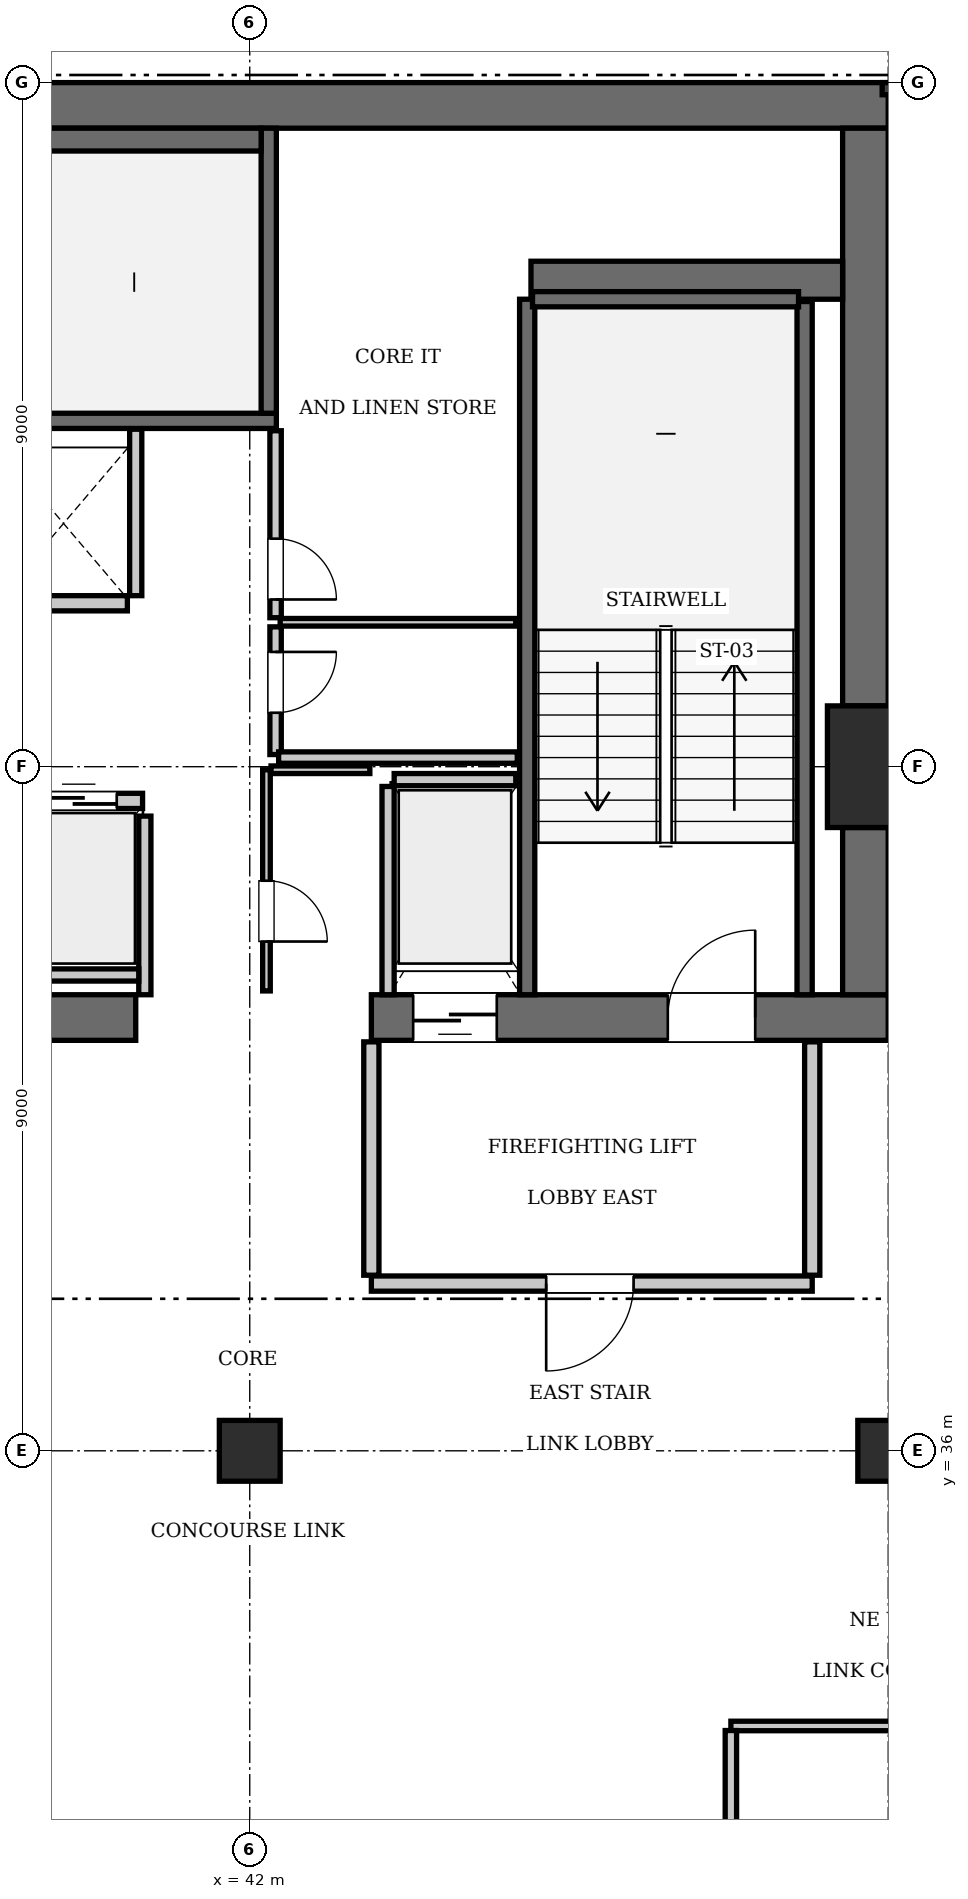
"""IFC4 building model, lengths in metres.
Left out: names, types, materials, properties, quantities, classifications, styles, units other than length and angle.
Written with IfcOpenShell. Run it as: python <this file> out.ifc"""

import sys

from ifc_helpers import new_model, si_unit, direction, frame, frame_2d, origin, origin_2d, place, context, subcontext, project, spatial, rectangle, extrude, element, fill, save


model = new_model("IFC4")
c1 = context("Model", 3, precision=1e-05, world=origin(), true_north=direction((0.0, 1.0)))
c2 = subcontext(c1, "Body", "Model", "MODEL_VIEW")
j1 = project(units=[si_unit("LENGTHUNIT", "METRE"), si_unit("PLANEANGLEUNIT", "RADIAN")], contexts=[c1])
p1 = place(None, origin())
s1 = spatial("IfcSite", under=j1, at=p1, CompositionType="ELEMENT")
p2 = place(p1, origin())
s2 = spatial("IfcBuilding", under=s1, at=p2, CompositionType="ELEMENT")
p3 = place(p2, frame((0.0, 0.0, 262.5)))
s3 = spatial("IfcBuildingStorey", under=s2, at=p3, CompositionType="ELEMENT", Elevation=262.5)
p4 = place(p3, frame((50.4, 45.0, 0.0), z_axis=(0.0, 0.0, 1.0), x_axis=(1.0, 0.0, 0.0)))
e1 = element("IfcColumn", 1, at=p4, inside=s3, PredefinedType="COLUMN", context=c2, shape_type="SweptSolid", body=[
    extrude(rectangle(XDim=1.6, YDim=1.6, at=origin_2d()), origin(), (0.0, 0.0, 1.0), 3.85),
])
p5 = place(p3, frame((25.2, 53.7, 0.0), z_axis=(0.0, 0.0, 1.0), x_axis=(1.0, 0.0, 0.0)))
e2 = element("IfcWall", 2, at=p5, inside=s3, PredefinedType="SHEAR", context=c2, shape_type="SweptSolid", body=[
    extrude(rectangle(XDim=25.2, YDim=0.6, at=frame_2d((12.6, 0.0))), origin(), (0.0, 0.0, 1.0), 3.85),
])
p6 = place(p3, frame((35.1, 41.7, 0.0), z_axis=(0.0, 0.0, 1.0), x_axis=(1.0, 0.0, 0.0)))
e3 = element("IfcWall", 3, at=p6, inside=s3, PredefinedType="SHEAR", context=c2, shape_type="SweptSolid", body=[
    extrude(rectangle(XDim=5.4, YDim=0.6, at=frame_2d((2.7, 0.0))), origin(), (0.0, 0.0, 1.0), 3.85),
])
p7 = place(p3, frame((43.6, 41.7, 0.0), z_axis=(0.0, 0.0, 1.0), x_axis=(1.0, 0.0, 0.0)))
e4 = element("IfcWall", 4, at=p7, inside=s3, PredefinedType="SHEAR", context=c2, shape_type="SweptSolid", body=[
    extrude(rectangle(XDim=6.8, YDim=0.6, at=frame_2d((3.4, 0.0))), origin(), (0.0, 0.0, 1.0), 3.85),
])
p8 = place(p7, frame((3.9, 0.0, 0.0)))
e5 = element("IfcOpeningElement", 5, at=p8, cuts=e4, PredefinedType="OPENING", context=c2, shape_type="SweptSolid", body=[
    extrude(rectangle(XDim=1.15, YDim=2.15, at=frame_2d((0.575, 1.075))), frame((0.0, 0.31, 0.0), z_axis=(0.0, -1.0, 0.0), x_axis=(1.0, 0.0, 0.0)), (0.0, 0.0, 1.0), 0.62),
])
p9 = place(p7, frame((0.55, 0.0, 0.0)))
e6 = element("IfcOpeningElement", 6, at=p9, cuts=e4, PredefinedType="OPENING", context=c2, shape_type="SweptSolid", body=[
    extrude(rectangle(XDim=1.1, YDim=2.2, at=frame_2d((0.55, 1.1))), frame((0.0, 0.31, 0.0), z_axis=(0.0, -1.0, 0.0), x_axis=(1.0, 0.0, 0.0)), (0.0, 0.0, 1.0), 0.62),
])
p10 = place(p3, frame((50.1, 42.0, 0.0), z_axis=(0.0, 0.0, 1.0), x_axis=(0.0, 1.0, 0.0)))
e7 = element("IfcWall", 7, at=p10, inside=s3, PredefinedType="SHEAR", context=c2, shape_type="SweptSolid", body=[
    extrude(rectangle(XDim=2.2, YDim=0.6, at=frame_2d((1.1, 0.0))), origin(), (0.0, 0.0, 1.0), 3.85),
])
p11 = place(p3, frame((50.1, 45.8, 0.0), z_axis=(0.0, 0.0, 1.0), x_axis=(0.0, 1.0, 0.0)))
e8 = element("IfcWall", 8, at=p11, inside=s3, PredefinedType="SHEAR", context=c2, shape_type="SweptSolid", body=[
    extrude(rectangle(XDim=7.6, YDim=0.6, at=frame_2d((3.8, 0.0))), origin(), (0.0, 0.0, 1.0), 3.85),
])
p12 = place(p3, frame((45.7, 51.4, 0.0), z_axis=(0.0, 0.0, 1.0), x_axis=(1.0, 0.0, 0.0)))
e9 = element("IfcWall", 9, at=p12, inside=s3, PredefinedType="SHEAR", context=c2, shape_type="SweptSolid", body=[
    extrude(rectangle(XDim=4.1, YDim=0.5, at=frame_2d((2.05, 0.0))), origin(), (0.0, 0.0, 1.0), 3.85),
])
for number, where, z_axis, x_axis in (
    (10, (42.0, 36.0, 0.0), (0.0, 0.0, 1.0), (1.0, 0.0, 0.0)),
    (11, (50.4, 36.0, 0.0), (0.0, 0.0, 1.0), (1.0, 0.0, 0.0)),
):
    element("IfcColumn", number, at=place(p3, frame(where, z_axis=z_axis, x_axis=x_axis)), inside=s3, PredefinedType="COLUMN", context=c2, shape_type="SweptSolid", body=[
        extrude(rectangle(XDim=0.8, YDim=0.8, at=origin_2d()), origin(), (0.0, 0.0, 1.0), 3.85),
    ])
p13 = place(p3, frame((33.25, 49.55, 0.0), z_axis=(0.0, 0.0, 1.0), x_axis=(1.0, 0.0, 0.0)))
e12 = element("IfcWall", 12, at=p13, inside=s3, PredefinedType="SOLIDWALL", context=c2, shape_type="SweptSolid", body=[
    extrude(rectangle(XDim=9.1, YDim=0.2, at=frame_2d((4.55, 0.0))), origin(), (0.0, 0.0, 1.0), 3.61),
])
p14 = place(p3, frame((42.25, 49.65, 0.0), z_axis=(0.0, 0.0, 1.0), x_axis=(0.0, 1.0, 0.0)))
e13 = element("IfcWall", 13, at=p14, inside=s3, PredefinedType="SOLIDWALL", context=c2, shape_type="SweptSolid", body=[
    extrude(rectangle(XDim=3.75, YDim=0.2, at=frame_2d((1.875, 0.0))), origin(), (0.0, 0.0, 1.0), 3.61),
])
p15 = place(p3, frame((33.45, 53.25, 0.0), z_axis=(0.0, 0.0, 1.0), x_axis=(1.0, 0.0, 0.0)))
e14 = element("IfcWall", 14, at=p15, inside=s3, PredefinedType="SOLIDWALL", context=c2, shape_type="SweptSolid", body=[
    extrude(rectangle(XDim=8.7, YDim=0.3, at=frame_2d((4.35, 0.0))), origin(), (0.0, 0.0, 1.0), 3.61),
])
p16 = place(p3, frame((45.65, 42.0, 0.0), z_axis=(0.0, 0.0, 1.0), x_axis=(0.0, 1.0, 0.0)))
e15 = element("IfcWall", 15, at=p16, inside=s3, PredefinedType="SOLIDWALL", context=c2, shape_type="SweptSolid", body=[
    extrude(rectangle(XDim=9.15, YDim=0.2, at=frame_2d((4.575, 0.0))), origin(), (0.0, 0.0, 1.0), 3.61),
])
p17 = place(p3, frame((49.3, 42.0, 0.0), z_axis=(0.0, 0.0, 1.0), x_axis=(0.0, 1.0, 0.0)))
e16 = element("IfcWall", 16, at=p17, inside=s3, PredefinedType="SOLIDWALL", context=c2, shape_type="SweptSolid", body=[
    extrude(rectangle(XDim=9.12, YDim=0.2, at=frame_2d((4.56, 0.0))), origin(), (0.0, 0.0, 1.0), 3.61),
])
p18 = place(p3, frame((45.72, 51.15, 0.0), z_axis=(0.0, 0.0, 1.0), x_axis=(1.0, 0.0, 0.0)))
e17 = element("IfcWall", 17, at=p18, inside=s3, PredefinedType="SOLIDWALL", context=c2, shape_type="SweptSolid", body=[
    extrude(rectangle(XDim=3.5, YDim=0.2, at=frame_2d((1.75, 0.0))), origin(), (0.0, 0.0, 1.0), 3.61),
])
p19 = place(p3, frame((38.91, 44.55, 0.0), z_axis=(0.0, 0.0, 1.0), x_axis=(1.0, 0.0, 0.0)))
e18 = element("IfcWall", 18, at=p19, inside=s3, PredefinedType="SOLIDWALL", context=c2, shape_type="SweptSolid", body=[
    extrude(rectangle(XDim=1.68, YDim=0.2, at=frame_2d((0.84, 0.0))), origin(), (0.0, 0.0, 1.0), 3.61),
])
p20 = place(p19, frame((0.34, 0.0, 0.0)))
e19 = element("IfcOpeningElement", 19, at=p20, cuts=e18, PredefinedType="OPENING", context=c2, shape_type="SweptSolid", body=[
    extrude(rectangle(XDim=1.0, YDim=2.15, at=frame_2d((0.5, 1.075))), frame((0.0, 0.11, 0.0), z_axis=(0.0, -1.0, 0.0), x_axis=(1.0, 0.0, 0.0)), (0.0, 0.0, 1.0), 0.22),
])
p21 = place(p3, frame((38.71, 47.15, 0.0), z_axis=(0.0, 0.0, 1.0), x_axis=(1.0, 0.0, 0.0)))
e20 = element("IfcWall", 20, at=p21, inside=s3, PredefinedType="SOLIDWALL", context=c2, shape_type="SweptSolid", body=[
    extrude(rectangle(XDim=1.68, YDim=0.2, at=frame_2d((0.84, 0.0))), origin(), (0.0, 0.0, 1.0), 3.61),
])
p22 = place(p3, frame((43.9, 44.83, 0.0), z_axis=(0.0, 0.0, 1.0), x_axis=(1.0, 0.0, 0.0)))
e21 = element("IfcWall", 21, at=p22, inside=s3, PredefinedType="SOLIDWALL", context=c2, shape_type="SweptSolid", body=[
    extrude(rectangle(XDim=1.6, YDim=0.16, at=frame_2d((0.8, 0.0))), origin(), (0.0, 0.0, 1.0), 3.61),
])
p23 = place(p3, frame((43.82, 42.0, 0.0), z_axis=(0.0, 0.0, 1.0), x_axis=(0.0, 1.0, 0.0)))
e22 = element("IfcWall", 22, at=p23, inside=s3, PredefinedType="SOLIDWALL", context=c2, shape_type="SweptSolid", body=[
    extrude(rectangle(XDim=2.74, YDim=0.16, at=frame_2d((1.37, 0.0))), origin(), (0.0, 0.0, 1.0), 3.61),
])
p24 = place(p3, frame((40.62, 42.0, 0.0), z_axis=(0.0, 0.0, 1.0), x_axis=(0.0, 1.0, 0.0)))
e23 = element("IfcWall", 23, at=p24, inside=s3, PredefinedType="SOLIDWALL", context=c2, shape_type="SweptSolid", body=[
    extrude(rectangle(XDim=2.35, YDim=0.16, at=frame_2d((1.175, 0.0))), origin(), (0.0, 0.0, 1.0), 3.61),
])
p25 = place(p3, frame((35.52, 42.26, 0.0), z_axis=(0.0, 0.0, 1.0), x_axis=(1.0, 0.0, 0.0)))
e24 = element("IfcWall", 24, at=p25, inside=s3, PredefinedType="SOLIDWALL", context=c2, shape_type="SweptSolid", body=[
    extrude(rectangle(XDim=5.02, YDim=0.16, at=frame_2d((2.51, 0.0))), origin(), (0.0, 0.0, 1.0), 3.61),
])
p26 = place(p3, frame((40.5, 47.25, 0.0), z_axis=(0.0, 0.0, 1.0), x_axis=(0.0, 1.0, 0.0)))
e25 = element("IfcWall", 25, at=p26, inside=s3, PredefinedType="SOLIDWALL", context=c2, shape_type="SweptSolid", body=[
    extrude(rectangle(XDim=2.19, YDim=0.16, at=frame_2d((1.095, 0.0))), origin(), (0.0, 0.0, 1.0), 3.61),
])
p27 = place(p3, frame((43.6, 38.2, 0.0), z_axis=(0.0, 0.0, 1.0), x_axis=(1.0, 0.0, 0.0)))
e26 = element("IfcWall", 26, at=p27, inside=s3, PredefinedType="PARTITIONING", context=c2, shape_type="SweptSolid", body=[
    extrude(rectangle(XDim=5.8, YDim=0.2, at=frame_2d((2.9, 0.0))), origin(), (0.0, 0.0, 1.0), 3.61),
])
p28 = place(p27, frame((2.3, 0.0, 0.0)))
e27 = element("IfcOpeningElement", 27, at=p28, cuts=e26, PredefinedType="OPENING", context=c2, shape_type="SweptSolid", body=[
    extrude(rectangle(XDim=1.15, YDim=2.15, at=frame_2d((0.575, 1.075))), frame((0.0, 0.11, 0.0), z_axis=(0.0, -1.0, 0.0), x_axis=(1.0, 0.0, 0.0)), (0.0, 0.0, 1.0), 0.22),
])
for number, where, z_axis, x_axis in (
    (28, (43.6, 38.31, 0.0), (0.0, 0.0, 1.0), (0.0, 1.0, 0.0)),
    (29, (49.4, 38.31, 0.0), (0.0, 0.0, 1.0), (0.0, 1.0, 0.0)),
):
    element("IfcWall", number, at=place(p3, frame(where, z_axis=z_axis, x_axis=x_axis)), inside=s3, PredefinedType="PARTITIONING", context=c2, shape_type="SweptSolid", body=[
        extrude(rectangle(XDim=3.07, YDim=0.2, at=frame_2d((1.535, 0.0))), origin(), (0.0, 0.0, 1.0), 3.61),
    ])
p29 = place(p3, frame((42.22, 42.05, 0.0), z_axis=(0.0, 0.0, 1.0), x_axis=(0.0, 1.0, 0.0)))
e30 = element("IfcWall", 30, at=p29, inside=s3, PredefinedType="PARTITIONING", context=c2, shape_type="SweptSolid", body=[
    extrude(rectangle(XDim=2.91, YDim=0.1, at=frame_2d((1.455, 0.0))), origin(), (0.0, 0.0, 1.0), 3.61),
])
p30 = place(p29, frame((0.65, 0.0, 0.0)))
e31 = element("IfcOpeningElement", 31, at=p30, cuts=e30, PredefinedType="OPENING", context=c2, shape_type="SweptSolid", body=[
    extrude(rectangle(XDim=0.8, YDim=2.05, at=frame_2d((0.4, 1.025))), frame((0.0, 0.06, 0.0), z_axis=(0.0, -1.0, 0.0), x_axis=(1.0, 0.0, 0.0)), (0.0, 0.0, 1.0), 0.12),
])
p31 = place(p3, frame((42.28, 44.96, 0.0), z_axis=(0.0, 0.0, 1.0), x_axis=(1.0, 0.0, 0.0)))
e32 = element("IfcWall", 32, at=p31, inside=s3, PredefinedType="PARTITIONING", context=c2, shape_type="SweptSolid", body=[
    extrude(rectangle(XDim=1.3, YDim=0.1, at=frame_2d((0.65, 0.0))), origin(), (0.0, 0.0, 1.0), 3.61),
])
p32 = place(p3, frame((42.34, 45.16, 0.0), z_axis=(0.0, 0.0, 1.0), x_axis=(0.0, 1.0, 0.0)))
e33 = element("IfcWall", 33, at=p32, inside=s3, PredefinedType="PARTITIONING", context=c2, shape_type="SweptSolid", body=[
    extrude(rectangle(XDim=1.68, YDim=0.15, at=frame_2d((0.84, 0.0))), origin(), (0.0, 0.0, 1.0), 3.61),
])
p33 = place(p32, frame((0.55, 0.0, 0.0)))
e34 = element("IfcOpeningElement", 34, at=p33, cuts=e33, PredefinedType="OPENING", context=c2, shape_type="SweptSolid", body=[
    extrude(rectangle(XDim=0.8, YDim=2.05, at=frame_2d((0.4, 1.025))), frame((0.0, 0.085, 0.0), z_axis=(0.0, -1.0, 0.0), x_axis=(1.0, 0.0, 0.0)), (0.0, 0.0, 1.0), 0.17),
])
p34 = place(p3, frame((42.34, 46.96, 0.0), z_axis=(0.0, 0.0, 1.0), x_axis=(0.0, 1.0, 0.0)))
e35 = element("IfcWall", 35, at=p34, inside=s3, PredefinedType="PARTITIONING", context=c2, shape_type="SweptSolid", body=[
    extrude(rectangle(XDim=2.46, YDim=0.15, at=frame_2d((1.23, 0.0))), origin(), (0.0, 0.0, 1.0), 3.61),
])
p35 = place(p34, frame((0.24, 0.0, 0.0)))
e36 = element("IfcOpeningElement", 36, at=p35, cuts=e35, PredefinedType="OPENING", context=c2, shape_type="SweptSolid", body=[
    extrude(rectangle(XDim=0.8, YDim=2.05, at=frame_2d((0.4, 1.025))), frame((0.0, 0.085, 0.0), z_axis=(0.0, -1.0, 0.0), x_axis=(1.0, 0.0, 0.0)), (0.0, 0.0, 1.0), 0.17),
])
p36 = place(p3, frame((42.4, 46.9, 0.0), z_axis=(0.0, 0.0, 1.0), x_axis=(1.0, 0.0, 0.0)))
e37 = element("IfcWall", 37, at=p36, inside=s3, PredefinedType="PARTITIONING", context=c2, shape_type="SweptSolid", body=[
    extrude(rectangle(XDim=3.1, YDim=0.1, at=frame_2d((1.55, 0.0))), origin(), (0.0, 0.0, 1.0), 3.61),
])
p37 = place(p3, frame((42.38, 45.12, 0.0), z_axis=(0.0, 0.0, 1.0), x_axis=(1.0, 0.0, 0.0)))
e38 = element("IfcWall", 38, at=p37, inside=s3, PredefinedType="PARTITIONING", context=c2, shape_type="SweptSolid", body=[
    extrude(rectangle(XDim=3.14, YDim=0.15, at=frame_2d((1.57, 0.0))), origin(), (0.0, 0.0, 1.0), 3.61),
])
p38 = place(p3, frame((48.33, 32.38, 0.0), z_axis=(0.0, 0.0, 1.0), x_axis=(1.0, 0.0, 0.0)))
e39 = element("IfcWall", 39, at=p38, inside=s3, PredefinedType="PARTITIONING", context=c2, shape_type="SweptSolid", body=[
    extrude(rectangle(XDim=11.77, YDim=0.125, at=frame_2d((5.885, 0.0))), origin(), (0.0, 0.0, 1.0), 3.61),
])
p39 = place(p3, frame((48.33, 30.24, 0.0), z_axis=(0.0, 0.0, 1.0), x_axis=(0.0, 1.0, 0.0)))
e40 = element("IfcWall", 40, at=p39, inside=s3, PredefinedType="PARTITIONING", context=c2, shape_type="SweptSolid", body=[
    extrude(rectangle(XDim=2.08, YDim=0.15, at=frame_2d((1.04, 0.0))), origin(), (0.0, 0.0, 1.0), 3.61),
])
p40 = place(p8, origin())
e41 = element("IfcDoor", 41, at=p40, inside=s3, OperationType="SINGLE_SWING_RIGHT", PredefinedType="DOOR", context=c2, shape_type="SweptSolid", body=[
    extrude(rectangle(XDim=1.15, YDim=2.15, at=frame_2d((0.575, 1.075))), frame((0.0, 0.025, 0.0), z_axis=(0.0, -1.0, 0.0), x_axis=(1.0, 0.0, 0.0)), (0.0, 0.0, 1.0), 0.05),
])
fill(e5, e41)
p41 = place(p20, origin())
e42 = element("IfcDoor", 42, at=p41, inside=s3, OperationType="SLIDING_TO_LEFT", PredefinedType="DOOR", context=c2, shape_type="SweptSolid", body=[
    extrude(rectangle(XDim=1.0, YDim=2.15, at=frame_2d((0.5, 1.075))), frame((0.0, 0.025, 0.0), z_axis=(0.0, -1.0, 0.0), x_axis=(1.0, 0.0, 0.0)), (0.0, 0.0, 1.0), 0.05),
])
fill(e19, e42)
p42 = place(p9, frame((1.1, 0.0, 0.0), z_axis=(0.0, 0.0, 1.0), x_axis=(-1.0, 0.0, 0.0)))
e43 = element("IfcDoor", 43, at=p42, inside=s3, OperationType="SLIDING_TO_LEFT", PredefinedType="DOOR", context=c2, shape_type="SweptSolid", body=[
    extrude(rectangle(XDim=1.1, YDim=2.2, at=frame_2d((0.55, 1.1))), frame((0.0, 0.025, 0.0), z_axis=(0.0, -1.0, 0.0), x_axis=(1.0, 0.0, 0.0)), (0.0, 0.0, 1.0), 0.05),
])
fill(e6, e43)
p43 = place(p28, frame((1.15, 0.0, 0.0), z_axis=(0.0, 0.0, 1.0), x_axis=(-1.0, 0.0, 0.0)))
e44 = element("IfcDoor", 44, at=p43, inside=s3, OperationType="SINGLE_SWING_RIGHT", PredefinedType="DOOR", context=c2, shape_type="SweptSolid", body=[
    extrude(rectangle(XDim=1.15, YDim=2.15, at=frame_2d((0.575, 1.075))), frame((0.0, 0.025, 0.0), z_axis=(0.0, -1.0, 0.0), x_axis=(1.0, 0.0, 0.0)), (0.0, 0.0, 1.0), 0.05),
])
fill(e27, e44)
p44 = place(p30, frame((0.8, 0.0, 0.0), z_axis=(0.0, 0.0, 1.0), x_axis=(-1.0, 0.0, 0.0)))
e45 = element("IfcDoor", 45, at=p44, inside=s3, OperationType="SINGLE_SWING_RIGHT", PredefinedType="DOOR", context=c2, shape_type="SweptSolid", body=[
    extrude(rectangle(XDim=0.8, YDim=2.05, at=frame_2d((0.4, 1.025))), frame((0.0, 0.025, 0.0), z_axis=(0.0, -1.0, 0.0), x_axis=(1.0, 0.0, 0.0)), (0.0, 0.0, 1.0), 0.05),
])
fill(e31, e45)
p45 = place(p33, frame((0.8, 0.0, 0.0), z_axis=(0.0, 0.0, 1.0), x_axis=(-1.0, 0.0, 0.0)))
e46 = element("IfcDoor", 46, at=p45, inside=s3, OperationType="SINGLE_SWING_LEFT", PredefinedType="DOOR", context=c2, shape_type="SweptSolid", body=[
    extrude(rectangle(XDim=0.8, YDim=2.05, at=frame_2d((0.4, 1.025))), frame((0.0, 0.025, 0.0), z_axis=(0.0, -1.0, 0.0), x_axis=(1.0, 0.0, 0.0)), (0.0, 0.0, 1.0), 0.05),
])
fill(e34, e46)
p46 = place(p35, frame((0.8, 0.0, 0.0), z_axis=(0.0, 0.0, 1.0), x_axis=(-1.0, 0.0, 0.0)))
e47 = element("IfcDoor", 47, at=p46, inside=s3, OperationType="SINGLE_SWING_RIGHT", PredefinedType="DOOR", context=c2, shape_type="SweptSolid", body=[
    extrude(rectangle(XDim=0.8, YDim=2.05, at=frame_2d((0.4, 1.025))), frame((0.0, 0.025, 0.0), z_axis=(0.0, -1.0, 0.0), x_axis=(1.0, 0.0, 0.0)), (0.0, 0.0, 1.0), 0.05),
])
fill(e36, e47)
save(model, sys.argv[1])
